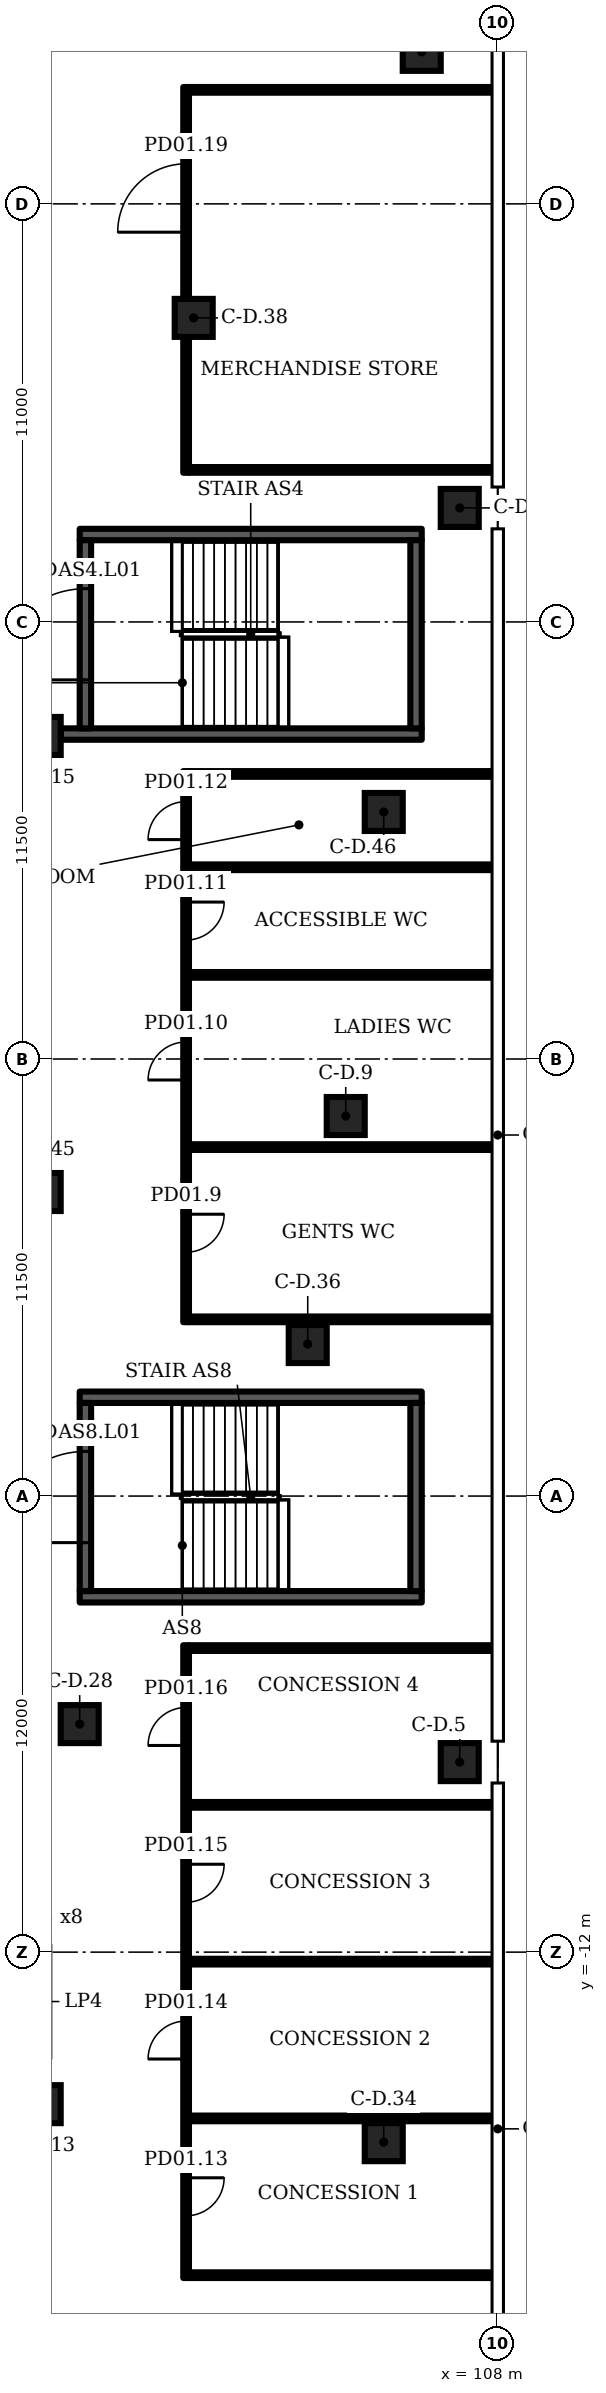
"""IFC4 building model, lengths in metres.
Left out: names, types, materials, properties, quantities, classifications, styles, units other than length and angle.
Written with IfcOpenShell. Run it as: python <this file> out.ifc"""

import sys

from ifc_helpers import new_model, si_unit, direction, frame, frame_2d, origin, origin_2d, place, context, subcontext, project, spatial, rectangle, extrude, element, fill, save


model = new_model("IFC4")
c1 = context("Model", 3, precision=1e-05, world=origin(), true_north=direction((0.0, 1.0)))
c2 = subcontext(c1, "Body", "Model", "MODEL_VIEW")
j1 = project(units=[si_unit("LENGTHUNIT", "METRE"), si_unit("PLANEANGLEUNIT", "RADIAN")], contexts=[c1])
p1 = place(None, origin())
s1 = spatial("IfcSite", under=j1, at=p1, CompositionType="ELEMENT")
p2 = place(p1, origin())
s2 = spatial("IfcBuilding", under=s1, at=p2, CompositionType="ELEMENT")
p3 = place(p2, frame((0.0, 0.0, 8.0)))
s3 = spatial("IfcBuildingStorey", under=s2, at=p3, CompositionType="ELEMENT", Elevation=8.0)
for number, where, z_axis, x_axis in (
    (1, (107.0, 26.0, 0.0), (0.0, 0.0, 1.0), (1.0, 0.0, 0.0)),
    (2, (107.0, -7.0, 0.0), (0.0, 0.0, 1.0), (1.0, 0.0, 0.0)),
    (3, (104.0, 10.0, 0.0), (0.0, 0.0, 1.0), (1.0, 0.0, 0.0)),
    (4, (96.0, -16.0, 0.0), (0.0, 0.0, 1.0), (1.0, 0.0, 0.0)),
    (5, (96.0, 20.0, 0.0), (0.0, 0.0, 1.0), (1.0, 0.0, 0.0)),
    (6, (106.0, 38.0, 0.0), (0.0, 0.0, 1.0), (1.0, 0.0, 0.0)),
    (7, (97.0, -6.0, 0.0), (0.0, 0.0, 1.0), (1.0, 0.0, 0.0)),
    (8, (105.0, -17.0, 0.0), (0.0, 0.0, 1.0), (1.0, 0.0, 0.0)),
    (9, (103.0, 4.0, 0.0), (0.0, 0.0, 1.0), (1.0, 0.0, 0.0)),
    (10, (100.0, 31.0, 0.0), (0.0, 0.0, 1.0), (1.0, 0.0, 0.0)),
    (11, (96.0, 8.0, 0.0), (0.0, 0.0, 1.0), (1.0, 0.0, 0.0)),
    (12, (105.0, 18.0, 0.0), (0.0, 0.0, 1.0), (1.0, 0.0, 0.0)),
):
    element("IfcColumn", number, at=place(p3, frame(where, z_axis=z_axis, x_axis=x_axis)), inside=s3, PredefinedType="COLUMN", context=c2, shape_type="SweptSolid", body=[
        extrude(rectangle(XDim=1.0, YDim=1.0, at=origin_2d()), origin(), (0.0, 0.0, 1.0), 7.0),
    ])
for number, where, z_axis, x_axis in (
    (13, (99.875, -20.5, 0.0), (0.0, 0.0, 1.0), (1.0, 0.0, 0.0)),
    (14, (99.875, -4.0, 0.0), (0.0, 0.0, 1.0), (1.0, 0.0, 0.0)),
    (15, (99.875, 19.0, 0.0), (0.0, 0.0, 1.0), (1.0, 0.0, 0.0)),
    (16, (99.875, 4.65, 0.0), (0.0, 0.0, 1.0), (1.0, 0.0, 0.0)),
    (17, (99.875, 9.182, 0.0), (0.0, 0.0, 1.0), (1.0, 0.0, 0.0)),
):
    element("IfcWall", number, at=place(p3, frame(where, z_axis=z_axis, x_axis=x_axis)), inside=s3, PredefinedType="PARTITIONING", context=c2, shape_type="SweptSolid", body=[
        extrude(rectangle(XDim=8.02, YDim=0.15, at=frame_2d((4.01, 0.0))), origin(), (0.0, 0.0, 1.0), 6.7),
    ])
p4 = place(p3, frame((99.8, -20.575, 0.0), z_axis=(0.0, 0.0, 1.0), x_axis=(0.0, 1.0, 0.0)))
e18 = element("IfcWall", 18, at=p4, inside=s3, PredefinedType="PARTITIONING", context=c2, shape_type="SweptSolid", body=[
    extrude(rectangle(XDim=16.65, YDim=0.15, at=frame_2d((8.325, 0.0))), origin(), (0.0, 0.0, 1.0), 6.7),
])
p5 = place(p4, frame((1.637, 0.0, 0.0)))
e19 = element("IfcOpeningElement", 19, at=p5, cuts=e18, PredefinedType="OPENING", context=c2, shape_type="SweptSolid", body=[
    extrude(rectangle(XDim=1.0, YDim=2.1, at=frame_2d((0.5, 1.05))), frame((0.0, 0.085, 0.0), z_axis=(0.0, -1.0, 0.0), x_axis=(1.0, 0.0, 0.0)), (0.0, 0.0, 1.0), 0.17),
])
p6 = place(p4, frame((5.762, 0.0, 0.0)))
e20 = element("IfcOpeningElement", 20, at=p6, cuts=e18, PredefinedType="OPENING", context=c2, shape_type="SweptSolid", body=[
    extrude(rectangle(XDim=1.0, YDim=2.1, at=frame_2d((0.5, 1.05))), frame((0.0, 0.085, 0.0), z_axis=(0.0, -1.0, 0.0), x_axis=(1.0, 0.0, 0.0)), (0.0, 0.0, 1.0), 0.17),
])
p7 = place(p4, frame((9.887, 0.0, 0.0)))
e21 = element("IfcOpeningElement", 21, at=p7, cuts=e18, PredefinedType="OPENING", context=c2, shape_type="SweptSolid", body=[
    extrude(rectangle(XDim=1.0, YDim=2.1, at=frame_2d((0.5, 1.05))), frame((0.0, 0.085, 0.0), z_axis=(0.0, -1.0, 0.0), x_axis=(1.0, 0.0, 0.0)), (0.0, 0.0, 1.0), 0.17),
])
p8 = place(p4, frame((14.012, 0.0, 0.0)))
e22 = element("IfcOpeningElement", 22, at=p8, cuts=e18, PredefinedType="OPENING", context=c2, shape_type="SweptSolid", body=[
    extrude(rectangle(XDim=1.0, YDim=2.1, at=frame_2d((0.5, 1.05))), frame((0.0, 0.085, 0.0), z_axis=(0.0, -1.0, 0.0), x_axis=(1.0, 0.0, 0.0)), (0.0, 0.0, 1.0), 0.17),
])
p9 = place(p3, frame((99.8, 4.575, 0.0), z_axis=(0.0, 0.0, 1.0), x_axis=(0.0, 1.0, 0.0)))
e23 = element("IfcWall", 23, at=p9, inside=s3, PredefinedType="PARTITIONING", context=c2, shape_type="SweptSolid", body=[
    extrude(rectangle(XDim=14.5, YDim=0.15, at=frame_2d((7.25, 0.0))), origin(), (0.0, 0.0, 1.0), 6.7),
])
p10 = place(p9, frame((1.841, 0.0, 0.0)))
e24 = element("IfcOpeningElement", 24, at=p10, cuts=e23, PredefinedType="OPENING", context=c2, shape_type="SweptSolid", body=[
    extrude(rectangle(XDim=1.0, YDim=2.1, at=frame_2d((0.5, 1.05))), frame((0.0, 0.085, 0.0), z_axis=(0.0, -1.0, 0.0), x_axis=(1.0, 0.0, 0.0)), (0.0, 0.0, 1.0), 0.17),
])
p11 = place(p9, frame((6.372, 0.0, 0.0)))
e25 = element("IfcOpeningElement", 25, at=p11, cuts=e23, PredefinedType="OPENING", context=c2, shape_type="SweptSolid", body=[
    extrude(rectangle(XDim=1.0, YDim=2.1, at=frame_2d((0.5, 1.05))), frame((0.0, 0.085, 0.0), z_axis=(0.0, -1.0, 0.0), x_axis=(1.0, 0.0, 0.0)), (0.0, 0.0, 1.0), 0.17),
])
p12 = place(p9, frame((10.054, 0.0, 0.0)))
e26 = element("IfcOpeningElement", 26, at=p12, cuts=e23, PredefinedType="OPENING", context=c2, shape_type="SweptSolid", body=[
    extrude(rectangle(XDim=1.0, YDim=2.1, at=frame_2d((0.5, 1.05))), frame((0.0, 0.085, 0.0), z_axis=(0.0, -1.0, 0.0), x_axis=(1.0, 0.0, 0.0)), (0.0, 0.0, 1.0), 0.17),
])
p13 = place(p9, frame((12.698, 0.0, 0.0)))
e27 = element("IfcOpeningElement", 27, at=p13, cuts=e23, PredefinedType="OPENING", context=c2, shape_type="SweptSolid", body=[
    extrude(rectangle(XDim=1.0, YDim=2.1, at=frame_2d((0.5, 1.05))), frame((0.0, 0.085, 0.0), z_axis=(0.0, -1.0, 0.0), x_axis=(1.0, 0.0, 0.0)), (0.0, 0.0, 1.0), 0.17),
])
p14 = place(p3, frame((99.8, 26.925, 0.0), z_axis=(0.0, 0.0, 1.0), x_axis=(0.0, 1.0, 0.0)))
e28 = element("IfcWall", 28, at=p14, inside=s3, PredefinedType="PARTITIONING", context=c2, shape_type="SweptSolid", body=[
    extrude(rectangle(XDim=3.565, YDim=0.15, at=frame_2d((1.782, 0.0))), origin(), (0.0, 0.0, 1.0), 6.7),
])
p15 = place(p3, frame((99.8, 31.51, 0.0), z_axis=(0.0, 0.0, 1.0), x_axis=(0.0, 1.0, 0.0)))
e29 = element("IfcWall", 29, at=p15, inside=s3, PredefinedType="PARTITIONING", context=c2, shape_type="SweptSolid", body=[
    extrude(rectangle(XDim=5.565, YDim=0.15, at=frame_2d((2.782, 0.0))), origin(), (0.0, 0.0, 1.0), 6.7),
])
p16 = place(p15, frame((1.745, 0.0, 0.0)))
e30 = element("IfcOpeningElement", 30, at=p16, cuts=e29, PredefinedType="OPENING", context=c2, shape_type="SweptSolid", body=[
    extrude(rectangle(XDim=1.8, YDim=2.1, at=frame_2d((0.9, 1.05))), frame((0.0, 0.085, 0.0), z_axis=(0.0, -1.0, 0.0), x_axis=(1.0, 0.0, 0.0)), (0.0, 0.0, 1.0), 0.17),
])
for number, where, z_axis, x_axis in (
    (31, (99.875, 13.713, 0.0), (0.0, 0.0, 1.0), (1.0, 0.0, 0.0)),
    (32, (99.875, 16.545, 0.0), (0.0, 0.0, 1.0), (1.0, 0.0, 0.0)),
    (33, (99.875, -16.375, 0.0), (0.0, 0.0, 1.0), (1.0, 0.0, 0.0)),
    (34, (99.875, -12.25, 0.0), (0.0, 0.0, 1.0), (1.0, 0.0, 0.0)),
    (35, (99.875, -8.125, 0.0), (0.0, 0.0, 1.0), (1.0, 0.0, 0.0)),
    (36, (99.875, 27.0, 0.0), (0.0, 0.0, 1.0), (1.0, 0.0, 0.0)),
    (37, (99.875, 37.0, 0.0), (0.0, 0.0, 1.0), (1.0, 0.0, 0.0)),
):
    element("IfcWall", number, at=place(p3, frame(where, z_axis=z_axis, x_axis=x_axis)), inside=s3, PredefinedType="PARTITIONING", context=c2, shape_type="SweptSolid", body=[
        extrude(rectangle(XDim=8.02, YDim=0.15, at=frame_2d((4.01, 0.0))), origin(), (0.0, 0.0, 1.0), 6.7),
    ])
for number, where, z_axis, x_axis in (
    (38, (97.0, -2.65, 0.0), (0.0, 0.0, 1.0), (1.0, 0.0, 0.0)),
    (39, (97.0, 2.6, 0.0), (0.0, 0.0, 1.0), (1.0, 0.0, 0.0)),
):
    element("IfcWall", number, at=place(p3, frame(where, z_axis=z_axis, x_axis=x_axis)), inside=s3, PredefinedType="SHEAR", context=c2, shape_type="SweptSolid", body=[
        extrude(rectangle(XDim=9.0, YDim=0.3, at=frame_2d((4.5, 0.0))), origin(), (0.0, 0.0, 1.0), 6.7),
    ])
p17 = place(p3, frame((97.15, -2.5, 0.0), z_axis=(0.0, 0.0, 1.0), x_axis=(0.0, 1.0, 0.0)))
e40 = element("IfcWall", 40, at=p17, inside=s3, PredefinedType="SHEAR", context=c2, shape_type="SweptSolid", body=[
    extrude(rectangle(XDim=4.95, YDim=0.3, at=frame_2d((2.475, 0.0))), origin(), (0.0, 0.0, 1.0), 6.7),
])
p18 = place(p17, frame((1.275, 0.0, 0.0)))
e41 = element("IfcOpeningElement", 41, at=p18, cuts=e40, PredefinedType="OPENING", context=c2, shape_type="SweptSolid", body=[
    extrude(rectangle(XDim=2.4, YDim=2.1, at=frame_2d((1.2, 1.05))), frame((0.0, 0.16, 0.0), z_axis=(0.0, -1.0, 0.0), x_axis=(1.0, 0.0, 0.0)), (0.0, 0.0, 1.0), 0.32),
])
p19 = place(p3, frame((105.85, -2.5, 0.0), z_axis=(0.0, 0.0, 1.0), x_axis=(0.0, 1.0, 0.0)))
e42 = element("IfcWall", 42, at=p19, inside=s3, PredefinedType="SHEAR", context=c2, shape_type="SweptSolid", body=[
    extrude(rectangle(XDim=4.95, YDim=0.3, at=frame_2d((2.475, 0.0))), origin(), (0.0, 0.0, 1.0), 6.7),
])
p20 = place(p3, frame((96.5, 20.05, 0.0), z_axis=(0.0, 0.0, 1.0), x_axis=(1.0, 0.0, 0.0)))
e43 = element("IfcWall", 43, at=p20, inside=s3, PredefinedType="SHEAR", context=c2, shape_type="SweptSolid", body=[
    extrude(rectangle(XDim=9.5, YDim=0.3, at=frame_2d((4.75, 0.0))), origin(), (0.0, 0.0, 1.0), 6.7),
])
p21 = place(p3, frame((97.0, 25.3, 0.0), z_axis=(0.0, 0.0, 1.0), x_axis=(1.0, 0.0, 0.0)))
e44 = element("IfcWall", 44, at=p21, inside=s3, PredefinedType="SHEAR", context=c2, shape_type="SweptSolid", body=[
    extrude(rectangle(XDim=9.0, YDim=0.3, at=frame_2d((4.5, 0.0))), origin(), (0.0, 0.0, 1.0), 6.7),
])
p22 = place(p3, frame((97.15, 20.2, 0.0), z_axis=(0.0, 0.0, 1.0), x_axis=(0.0, 1.0, 0.0)))
e45 = element("IfcWall", 45, at=p22, inside=s3, PredefinedType="SHEAR", context=c2, shape_type="SweptSolid", body=[
    extrude(rectangle(XDim=4.95, YDim=0.3, at=frame_2d((2.475, 0.0))), origin(), (0.0, 0.0, 1.0), 6.7),
])
p23 = place(p22, frame((1.275, 0.0, 0.0)))
e46 = element("IfcOpeningElement", 46, at=p23, cuts=e45, PredefinedType="OPENING", context=c2, shape_type="SweptSolid", body=[
    extrude(rectangle(XDim=2.4, YDim=2.1, at=frame_2d((1.2, 1.05))), frame((0.0, 0.16, 0.0), z_axis=(0.0, -1.0, 0.0), x_axis=(1.0, 0.0, 0.0)), (0.0, 0.0, 1.0), 0.32),
])
p24 = place(p3, frame((105.85, 20.2, 0.0), z_axis=(0.0, 0.0, 1.0), x_axis=(0.0, 1.0, 0.0)))
e47 = element("IfcWall", 47, at=p24, inside=s3, PredefinedType="SHEAR", context=c2, shape_type="SweptSolid", body=[
    extrude(rectangle(XDim=4.95, YDim=0.3, at=frame_2d((2.475, 0.0))), origin(), (0.0, 0.0, 1.0), 6.7),
])
p25 = place(p10, origin())
e48 = element("IfcDoor", 48, at=p25, inside=s3, OperationType="SINGLE_SWING_RIGHT", PredefinedType="DOOR", context=c2, shape_type="SweptSolid", body=[
    extrude(rectangle(XDim=1.0, YDim=2.1, at=frame_2d((0.5, 1.05))), frame((0.0, 0.025, 0.0), z_axis=(0.0, -1.0, 0.0), x_axis=(1.0, 0.0, 0.0)), (0.0, 0.0, 1.0), 0.05),
])
fill(e24, e48)
p26 = place(p11, origin())
e49 = element("IfcDoor", 49, at=p26, inside=s3, OperationType="SINGLE_SWING_LEFT", PredefinedType="DOOR", context=c2, shape_type="SweptSolid", body=[
    extrude(rectangle(XDim=1.0, YDim=2.1, at=frame_2d((0.5, 1.05))), frame((0.0, 0.025, 0.0), z_axis=(0.0, -1.0, 0.0), x_axis=(1.0, 0.0, 0.0)), (0.0, 0.0, 1.0), 0.05),
])
fill(e25, e49)
p27 = place(p12, origin())
e50 = element("IfcDoor", 50, at=p27, inside=s3, OperationType="SINGLE_SWING_RIGHT", PredefinedType="DOOR", context=c2, shape_type="SweptSolid", body=[
    extrude(rectangle(XDim=1.0, YDim=2.1, at=frame_2d((0.5, 1.05))), frame((0.0, 0.025, 0.0), z_axis=(0.0, -1.0, 0.0), x_axis=(1.0, 0.0, 0.0)), (0.0, 0.0, 1.0), 0.05),
])
fill(e26, e50)
p28 = place(p13, origin())
e51 = element("IfcDoor", 51, at=p28, inside=s3, OperationType="SINGLE_SWING_LEFT", PredefinedType="DOOR", context=c2, shape_type="SweptSolid", body=[
    extrude(rectangle(XDim=1.0, YDim=2.1, at=frame_2d((0.5, 1.05))), frame((0.0, 0.025, 0.0), z_axis=(0.0, -1.0, 0.0), x_axis=(1.0, 0.0, 0.0)), (0.0, 0.0, 1.0), 0.05),
])
fill(e27, e51)
p29 = place(p5, origin())
e52 = element("IfcDoor", 52, at=p29, inside=s3, OperationType="SINGLE_SWING_RIGHT", PredefinedType="DOOR", context=c2, shape_type="SweptSolid", body=[
    extrude(rectangle(XDim=1.0, YDim=2.1, at=frame_2d((0.5, 1.05))), frame((0.0, 0.025, 0.0), z_axis=(0.0, -1.0, 0.0), x_axis=(1.0, 0.0, 0.0)), (0.0, 0.0, 1.0), 0.05),
])
fill(e19, e52)
p30 = place(p6, origin())
e53 = element("IfcDoor", 53, at=p30, inside=s3, OperationType="SINGLE_SWING_LEFT", PredefinedType="DOOR", context=c2, shape_type="SweptSolid", body=[
    extrude(rectangle(XDim=1.0, YDim=2.1, at=frame_2d((0.5, 1.05))), frame((0.0, 0.025, 0.0), z_axis=(0.0, -1.0, 0.0), x_axis=(1.0, 0.0, 0.0)), (0.0, 0.0, 1.0), 0.05),
])
fill(e20, e53)
p31 = place(p7, origin())
e54 = element("IfcDoor", 54, at=p31, inside=s3, OperationType="SINGLE_SWING_RIGHT", PredefinedType="DOOR", context=c2, shape_type="SweptSolid", body=[
    extrude(rectangle(XDim=1.0, YDim=2.1, at=frame_2d((0.5, 1.05))), frame((0.0, 0.025, 0.0), z_axis=(0.0, -1.0, 0.0), x_axis=(1.0, 0.0, 0.0)), (0.0, 0.0, 1.0), 0.05),
])
fill(e21, e54)
p32 = place(p8, origin())
e55 = element("IfcDoor", 55, at=p32, inside=s3, OperationType="SINGLE_SWING_LEFT", PredefinedType="DOOR", context=c2, shape_type="SweptSolid", body=[
    extrude(rectangle(XDim=1.0, YDim=2.1, at=frame_2d((0.5, 1.05))), frame((0.0, 0.025, 0.0), z_axis=(0.0, -1.0, 0.0), x_axis=(1.0, 0.0, 0.0)), (0.0, 0.0, 1.0), 0.05),
])
fill(e22, e55)
p33 = place(p16, origin())
e56 = element("IfcDoor", 56, at=p33, inside=s3, OperationType="DOUBLE_DOOR_SINGLE_SWING", PredefinedType="DOOR", context=c2, shape_type="SweptSolid", body=[
    extrude(rectangle(XDim=1.8, YDim=2.1, at=frame_2d((0.9, 1.05))), frame((0.0, 0.025, 0.0), z_axis=(0.0, -1.0, 0.0), x_axis=(1.0, 0.0, 0.0)), (0.0, 0.0, 1.0), 0.05),
])
fill(e30, e56)
p34 = place(p18, origin())
e57 = element("IfcDoor", 57, at=p34, inside=s3, OperationType="DOUBLE_DOOR_SINGLE_SWING", PredefinedType="DOOR", context=c2, shape_type="SweptSolid", body=[
    extrude(rectangle(XDim=2.4, YDim=2.1, at=frame_2d((1.2, 1.05))), frame((0.0, 0.025, 0.0), z_axis=(0.0, -1.0, 0.0), x_axis=(1.0, 0.0, 0.0)), (0.0, 0.0, 1.0), 0.05),
])
fill(e41, e57)
p35 = place(p23, origin())
e58 = element("IfcDoor", 58, at=p35, inside=s3, OperationType="DOUBLE_DOOR_SINGLE_SWING", PredefinedType="DOOR", context=c2, shape_type="SweptSolid", body=[
    extrude(rectangle(XDim=2.4, YDim=2.1, at=frame_2d((1.2, 1.05))), frame((0.0, 0.025, 0.0), z_axis=(0.0, -1.0, 0.0), x_axis=(1.0, 0.0, 0.0)), (0.0, 0.0, 1.0), 0.05),
])
fill(e46, e58)
save(model, sys.argv[1])
